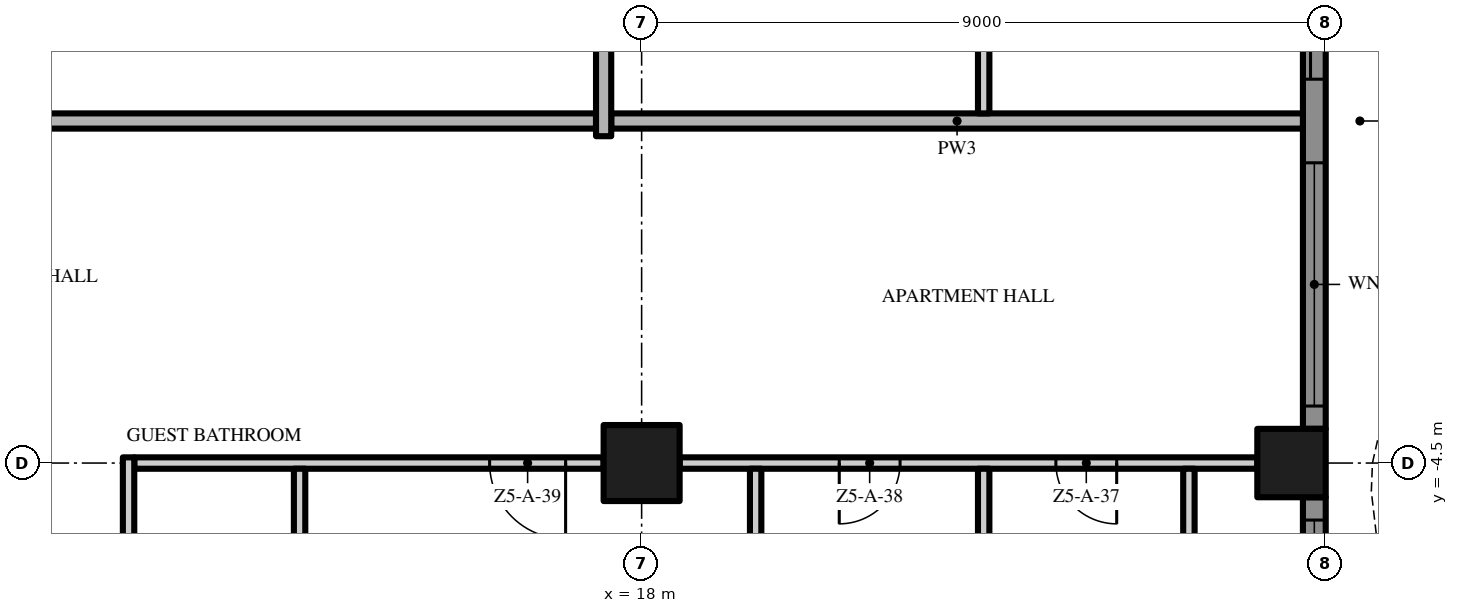
"""IFC4 building model, lengths in metres.
Left out: names, types, materials, properties, quantities, classifications, styles, units other than length and angle.
Written with IfcOpenShell. Run it as: python <this file> out.ifc"""

import sys

from ifc_helpers import new_model, si_unit, direction, frame, frame_2d, origin, origin_2d, place, context, subcontext, project, spatial, polyline, rectangle, outline, extrude, element, fill, save


model = new_model("IFC4")
c1 = context("Model", 3, precision=1e-05, world=origin(), true_north=direction((0.0, 1.0)))
c2 = subcontext(c1, "Body", "Model", "MODEL_VIEW")
j1 = project(units=[si_unit("LENGTHUNIT", "METRE"), si_unit("PLANEANGLEUNIT", "RADIAN")], contexts=[c1])
p1 = place(None, origin())
s1 = spatial("IfcSite", under=j1, at=p1, CompositionType="ELEMENT")
p2 = place(p1, origin())
s2 = spatial("IfcBuilding", under=s1, at=p2, CompositionType="ELEMENT")
p3 = place(p2, frame((0.0, 0.0, 238.8)))
s3 = spatial("IfcBuildingStorey", under=s2, at=p3, CompositionType="ELEMENT", Elevation=238.8)
p4 = place(p3, frame((18.0, -4.5, 0.0), z_axis=(0.0, 0.0, 1.0), x_axis=(1.0, 0.0, 0.0)))
e1 = element("IfcColumn", 1, at=p4, inside=s3, PredefinedType="COLUMN", context=c2, shape_type="SweptSolid", body=[
    extrude(rectangle(XDim=1.0, YDim=1.0, at=origin_2d()), origin(), (0.0, 0.0, 1.0), 3.5),
])
p5 = place(p3, frame((26.55, -4.5, 0.0), z_axis=(0.0, 0.0, 1.0), x_axis=(1.0, 0.0, 0.0)))
e2 = element("IfcColumn", 2, at=p5, inside=s3, PredefinedType="COLUMN", context=c2, shape_type="SweptSolid", body=[
    extrude(rectangle(XDim=0.9, YDim=0.9, at=origin_2d()), origin(), (0.0, 0.0, 1.0), 3.5),
])
p6 = place(p3, frame((26.85, -4.95, 0.0), z_axis=(0.0, 0.0, 1.0), x_axis=(0.0, -1.0, 0.0)))
e3 = element("IfcWall", 3, at=p6, inside=s3, PredefinedType="SOLIDWALL", context=c2, shape_type="SweptSolid", body=[
    extrude(rectangle(XDim=8.1, YDim=0.3, at=frame_2d((4.05, 0.0))), origin(), (0.0, 0.0, 1.0), 3.5),
])
p7 = place(p6, frame((4.6, 0.0, 0.0)))
e4 = element("IfcOpeningElement", 4, at=p7, cuts=e3, PredefinedType="OPENING", context=c2, shape_type="SweptSolid", body=[
    extrude(rectangle(XDim=3.2, YDim=2.4, at=frame_2d((1.6, 1.2))), frame((0.0, 0.16, 0.0), z_axis=(0.0, -1.0, 0.0), x_axis=(1.0, 0.0, 0.0)), (0.0, 0.0, 1.0), 0.32),
])
p8 = place(p6, frame((0.3, 0.0, 0.45)))
e5 = element("IfcOpeningElement", 5, at=p8, cuts=e3, PredefinedType="OPENING", context=c2, shape_type="SweptSolid", body=[
    extrude(rectangle(XDim=3.2, YDim=2.65, at=frame_2d((1.6, 1.325))), frame((0.0, 0.16, 0.0), z_axis=(0.0, -1.0, 0.0), x_axis=(1.0, 0.0, 0.0)), (0.0, 0.0, 1.0), 0.32),
])
p9 = place(p3, frame((26.85, 4.05, 0.0), z_axis=(0.0, 0.0, 1.0), x_axis=(0.0, -1.0, 0.0)))
e6 = element("IfcWall", 6, at=p9, inside=s3, PredefinedType="SOLIDWALL", context=c2, shape_type="SweptSolid", body=[
    extrude(rectangle(XDim=8.1, YDim=0.3, at=frame_2d((4.05, 0.0))), origin(), (0.0, 0.0, 1.0), 3.5),
])
p10 = place(p9, frame((4.6, 0.0, 0.45)))
e7 = element("IfcOpeningElement", 7, at=p10, cuts=e6, PredefinedType="OPENING", context=c2, shape_type="SweptSolid", body=[
    extrude(rectangle(XDim=3.2, YDim=2.65, at=frame_2d((1.6, 1.325))), frame((0.0, 0.16, 0.0), z_axis=(0.0, -1.0, 0.0), x_axis=(1.0, 0.0, 0.0)), (0.0, 0.0, 1.0), 0.32),
])
p11 = place(p9, frame((0.3, 0.0, 0.0)))
e8 = element("IfcOpeningElement", 8, at=p11, cuts=e6, PredefinedType="OPENING", context=c2, shape_type="SweptSolid", body=[
    extrude(rectangle(XDim=3.2, YDim=2.4, at=frame_2d((1.6, 1.2))), frame((0.0, 0.16, 0.0), z_axis=(0.0, -1.0, 0.0), x_axis=(1.0, 0.0, 0.0)), (0.0, 0.0, 1.0), 0.32),
])
p12 = place(p3, origin())
e9 = element("IfcWall", 9, at=p12, inside=s3, PredefinedType="USERDEFINED", context=c2, shape_type="SweptSolid", body=[
    extrude(outline(polyline([(27.951, -18.0), (28.612, -16.5), (29.345, -15.0), (29.869, -13.5), (30.0, -12.375), (29.985, -12.0), (29.649, -10.5), (28.988, -9.0), (28.255, -7.5), (27.731, -6.0), (27.6, -4.875), (27.615, -4.5), (27.951, -3.0), (28.612, -1.5), (29.345, 0.0), (29.869, 1.5), (30.0, 2.625), (29.985, 3.0), (29.649, 4.5), (28.988, 6.0), (28.255, 7.5), (27.731, 9.0), (27.6, 10.125), (27.615, 10.5), (27.951, 12.0), (28.612, 13.5), (29.345, 15.0), (29.869, 16.5), (30.0, 17.625), (29.985, 18.0), (29.735, 17.99), (29.749, 17.635), (29.624, 16.556), (29.114, 15.096), (28.385, 13.605), (27.713, 12.079), (27.366, 10.533), (27.349, 10.115), (27.486, 8.944), (28.024, 7.404), (28.761, 5.895), (29.41, 4.421), (29.736, 2.967), (29.749, 2.635), (29.624, 1.556), (29.114, 0.096), (28.385, -1.395), (27.713, -2.921), (27.366, -4.467), (27.349, -4.885), (27.486, -6.056), (28.024, -7.596), (28.761, -9.105), (29.41, -10.579), (29.736, -12.033), (29.749, -12.365), (29.624, -13.444), (29.114, -14.904), (28.385, -16.395), (27.723, -17.899), (27.951, -18.0)])), origin(), (0.0, 0.0, 1.0), 0.9),
])
p13 = place(p3, frame((17.5, -4.5, 0.0), z_axis=(0.0, 0.0, 1.0), x_axis=(-1.0, 0.0, 0.0)))
e10 = element("IfcWall", 10, at=p13, inside=s3, PredefinedType="PARTITIONING", context=c2, shape_type="SweptSolid", body=[
    extrude(rectangle(XDim=6.175, YDim=0.15, at=frame_2d((3.087, 0.0))), origin(), (0.0, 0.0, 1.0), 3.5),
])
p14 = place(p13, frame((0.5, 0.0, 0.0)))
e11 = element("IfcOpeningElement", 11, at=p14, cuts=e10, PredefinedType="OPENING", context=c2, shape_type="SweptSolid", body=[
    extrude(rectangle(XDim=1.0, YDim=2.4, at=frame_2d((0.5, 1.2))), frame((0.0, 0.085, 0.0), z_axis=(0.0, -1.0, 0.0), x_axis=(1.0, 0.0, 0.0)), (0.0, 0.0, 1.0), 0.17),
])
p15 = place(p3, frame((26.1, -4.5, 0.0), z_axis=(0.0, 0.0, 1.0), x_axis=(-1.0, 0.0, 0.0)))
e12 = element("IfcWall", 12, at=p15, inside=s3, PredefinedType="PARTITIONING", context=c2, shape_type="SweptSolid", body=[
    extrude(rectangle(XDim=7.6, YDim=0.15, at=frame_2d((3.8, 0.0))), origin(), (0.0, 0.0, 1.0), 3.5),
])
p16 = place(p15, frame((1.85, 0.0, 0.0)))
e13 = element("IfcOpeningElement", 13, at=p16, cuts=e12, PredefinedType="OPENING", context=c2, shape_type="SweptSolid", body=[
    extrude(rectangle(XDim=0.8, YDim=2.0, at=frame_2d((0.4, 1.0))), frame((0.0, 0.085, 0.0), z_axis=(0.0, -1.0, 0.0), x_axis=(1.0, 0.0, 0.0)), (0.0, 0.0, 1.0), 0.17),
])
p17 = place(p15, frame((4.7, 0.0, 0.0)))
e14 = element("IfcOpeningElement", 14, at=p17, cuts=e12, PredefinedType="OPENING", context=c2, shape_type="SweptSolid", body=[
    extrude(rectangle(XDim=0.8, YDim=2.0, at=frame_2d((0.4, 1.0))), frame((0.0, 0.085, 0.0), z_axis=(0.0, -1.0, 0.0), x_axis=(1.0, 0.0, 0.0)), (0.0, 0.0, 1.0), 0.17),
])
p18 = place(p3, frame((17.4, 0.0, 0.0), z_axis=(0.0, 0.0, 1.0), x_axis=(-1.0, 0.0, 0.0)))
e15 = element("IfcWall", 15, at=p18, inside=s3, PredefinedType="PARTITIONING", context=c2, shape_type="SweptSolid", body=[
    extrude(rectangle(XDim=34.8, YDim=0.2, at=frame_2d((17.4, 0.0))), origin(), (0.0, 0.0, 1.0), 3.5),
])
p19 = place(p18, frame((25.65, 0.0, 0.0)))
e16 = element("IfcOpeningElement", 16, at=p19, cuts=e15, PredefinedType="OPENING", context=c2, shape_type="SweptSolid", body=[
    extrude(rectangle(XDim=1.5, YDim=2.4, at=frame_2d((0.75, 1.2))), frame((0.0, 0.11, 0.0), z_axis=(0.0, -1.0, 0.0), x_axis=(1.0, 0.0, 0.0)), (0.0, 0.0, 1.0), 0.22),
])
p20 = place(p18, frame((7.65, 0.0, 0.0)))
e17 = element("IfcOpeningElement", 17, at=p20, cuts=e15, PredefinedType="OPENING", context=c2, shape_type="SweptSolid", body=[
    extrude(rectangle(XDim=1.5, YDim=2.4, at=frame_2d((0.75, 1.2))), frame((0.0, 0.11, 0.0), z_axis=(0.0, -1.0, 0.0), x_axis=(1.0, 0.0, 0.0)), (0.0, 0.0, 1.0), 0.22),
])
p21 = place(p3, frame((17.6, 0.0, 0.0), z_axis=(0.0, 0.0, 1.0), x_axis=(1.0, 0.0, 0.0)))
e18 = element("IfcWall", 18, at=p21, inside=s3, PredefinedType="PARTITIONING", context=c2, shape_type="SweptSolid", body=[
    extrude(rectangle(XDim=9.1, YDim=0.2, at=frame_2d((4.55, 0.0))), origin(), (0.0, 0.0, 1.0), 3.5),
])
p22 = place(p3, frame((11.25, -4.425, 0.0), z_axis=(0.0, 0.0, 1.0), x_axis=(0.0, -1.0, 0.0)))
e19 = element("IfcWall", 19, at=p22, inside=s3, PredefinedType="PARTITIONING", context=c2, shape_type="SweptSolid", body=[
    extrude(rectangle(XDim=4.65, YDim=0.15, at=frame_2d((2.325, 0.0))), origin(), (0.0, 0.0, 1.0), 3.5),
])
p23 = place(p22, frame((1.875, 0.0, 0.0)))
e20 = element("IfcOpeningElement", 20, at=p23, cuts=e19, PredefinedType="OPENING", context=c2, shape_type="SweptSolid", body=[
    extrude(rectangle(XDim=0.9, YDim=2.1, at=frame_2d((0.45, 1.05))), frame((0.0, 0.085, 0.0), z_axis=(0.0, -1.0, 0.0), x_axis=(1.0, 0.0, 0.0)), (0.0, 0.0, 1.0), 0.17),
])
p24 = place(p3, frame((13.5, -8.925, 0.0), z_axis=(0.0, 0.0, 1.0), x_axis=(0.0, 1.0, 0.0)))
e21 = element("IfcWall", 21, at=p24, inside=s3, PredefinedType="PARTITIONING", context=c2, shape_type="SweptSolid", body=[
    extrude(rectangle(XDim=4.35, YDim=0.15, at=frame_2d((2.175, 0.0))), origin(), (0.0, 0.0, 1.0), 3.5),
])
p25 = place(p3, frame((17.5, -0.2, 0.0), z_axis=(0.0, 0.0, 1.0), x_axis=(0.0, 1.0, 0.0)))
e22 = element("IfcWall", 22, at=p25, inside=s3, PredefinedType="PARTITIONING", context=c2, shape_type="SweptSolid", body=[
    extrude(rectangle(XDim=4.2, YDim=0.2, at=frame_2d((2.1, 0.0))), origin(), (0.0, 0.0, 1.0), 3.5),
])
for number, where, z_axis, x_axis in (
    (23, (19.5, -8.925, 0.0), (0.0, 0.0, 1.0), (0.0, 1.0, 0.0)),
    (24, (22.5, -8.925, 0.0), (0.0, 0.0, 1.0), (0.0, 1.0, 0.0)),
):
    element("IfcWall", number, at=place(p3, frame(where, z_axis=z_axis, x_axis=x_axis)), inside=s3, PredefinedType="PARTITIONING", context=c2, shape_type="SweptSolid", body=[
        extrude(rectangle(XDim=4.35, YDim=0.15, at=frame_2d((2.175, 0.0))), origin(), (0.0, 0.0, 1.0), 3.5),
    ])
p26 = place(p3, frame((22.5, 17.55, 0.0), z_axis=(0.0, 0.0, 1.0), x_axis=(0.0, -1.0, 0.0)))
e25 = element("IfcWall", 25, at=p26, inside=s3, PredefinedType="PARTITIONING", context=c2, shape_type="SweptSolid", body=[
    extrude(rectangle(XDim=17.45, YDim=0.15, at=frame_2d((8.725, 0.0))), origin(), (0.0, 0.0, 1.0), 3.5),
])
p27 = place(p26, frame((14.8, 0.0, 0.0)))
e26 = element("IfcOpeningElement", 26, at=p27, cuts=e25, PredefinedType="OPENING", context=c2, shape_type="SweptSolid", body=[
    extrude(rectangle(XDim=1.0, YDim=2.4, at=frame_2d((0.5, 1.2))), frame((0.0, 0.085, 0.0), z_axis=(0.0, -1.0, 0.0), x_axis=(1.0, 0.0, 0.0)), (0.0, 0.0, 1.0), 0.17),
])
p28 = place(p26, frame((11.45, 0.0, 0.0)))
e27 = element("IfcOpeningElement", 27, at=p28, cuts=e25, PredefinedType="OPENING", context=c2, shape_type="SweptSolid", body=[
    extrude(rectangle(XDim=1.0, YDim=2.4, at=frame_2d((0.5, 1.2))), frame((0.0, 0.085, 0.0), z_axis=(0.0, -1.0, 0.0), x_axis=(1.0, 0.0, 0.0)), (0.0, 0.0, 1.0), 0.17),
])
p29 = place(p26, frame((4.3, 0.0, 0.0)))
e28 = element("IfcOpeningElement", 28, at=p29, cuts=e25, PredefinedType="OPENING", context=c2, shape_type="SweptSolid", body=[
    extrude(rectangle(XDim=1.0, YDim=2.4, at=frame_2d((0.5, 1.2))), frame((0.0, 0.085, 0.0), z_axis=(0.0, -1.0, 0.0), x_axis=(1.0, 0.0, 0.0)), (0.0, 0.0, 1.0), 0.17),
])
p30 = place(p3, frame((25.2, -8.925, 0.0), z_axis=(0.0, 0.0, 1.0), x_axis=(0.0, 1.0, 0.0)))
e29 = element("IfcWall", 29, at=p30, inside=s3, PredefinedType="PARTITIONING", context=c2, shape_type="SweptSolid", body=[
    extrude(rectangle(XDim=4.35, YDim=0.15, at=frame_2d((2.175, 0.0))), origin(), (0.0, 0.0, 1.0), 3.5),
])
p31 = place(p8, origin())
e30 = element("IfcWindow", 30, at=p31, inside=s3, PartitioningType="SINGLE_PANEL", PredefinedType="WINDOW", context=c2, shape_type="SweptSolid", body=[
    extrude(rectangle(XDim=3.2, YDim=2.65, at=frame_2d((1.6, 1.325))), frame((0.0, 0.03, 0.0), z_axis=(0.0, -1.0, 0.0), x_axis=(1.0, 0.0, 0.0)), (0.0, 0.0, 1.0), 0.06),
])
fill(e5, e30)
p32 = place(p10, origin())
e31 = element("IfcWindow", 31, at=p32, inside=s3, PartitioningType="SINGLE_PANEL", PredefinedType="WINDOW", context=c2, shape_type="SweptSolid", body=[
    extrude(rectangle(XDim=3.2, YDim=2.65, at=frame_2d((1.6, 1.325))), frame((0.0, 0.03, 0.0), z_axis=(0.0, -1.0, 0.0), x_axis=(1.0, 0.0, 0.0)), (0.0, 0.0, 1.0), 0.06),
])
fill(e7, e31)
p33 = place(p11, origin())
e32 = element("IfcDoor", 32, at=p33, inside=s3, OperationType="SINGLE_SWING_LEFT", PredefinedType="DOOR", context=c2, shape_type="SweptSolid", body=[
    extrude(rectangle(XDim=3.2, YDim=2.4, at=frame_2d((1.6, 1.2))), frame((0.0, 0.025, 0.0), z_axis=(0.0, -1.0, 0.0), x_axis=(1.0, 0.0, 0.0)), (0.0, 0.0, 1.0), 0.05),
])
fill(e8, e32)
p34 = place(p16, origin())
e33 = element("IfcDoor", 33, at=p34, inside=s3, OperationType="SINGLE_SWING_LEFT", PredefinedType="DOOR", context=c2, shape_type="SweptSolid", body=[
    extrude(rectangle(XDim=0.8, YDim=2.0, at=frame_2d((0.4, 1.0))), frame((0.0, 0.025, 0.0), z_axis=(0.0, -1.0, 0.0), x_axis=(1.0, 0.0, 0.0)), (0.0, 0.0, 1.0), 0.05),
])
fill(e13, e33)
p35 = place(p17, origin())
e34 = element("IfcDoor", 34, at=p35, inside=s3, OperationType="SINGLE_SWING_RIGHT", PredefinedType="DOOR", context=c2, shape_type="SweptSolid", body=[
    extrude(rectangle(XDim=0.8, YDim=2.0, at=frame_2d((0.4, 1.0))), frame((0.0, 0.025, 0.0), z_axis=(0.0, -1.0, 0.0), x_axis=(1.0, 0.0, 0.0)), (0.0, 0.0, 1.0), 0.05),
])
fill(e14, e34)
p36 = place(p14, origin())
e35 = element("IfcDoor", 35, at=p36, inside=s3, OperationType="SINGLE_SWING_LEFT", PredefinedType="DOOR", context=c2, shape_type="SweptSolid", body=[
    extrude(rectangle(XDim=1.0, YDim=2.4, at=frame_2d((0.5, 1.2))), frame((0.0, 0.025, 0.0), z_axis=(0.0, -1.0, 0.0), x_axis=(1.0, 0.0, 0.0)), (0.0, 0.0, 1.0), 0.05),
])
fill(e11, e35)
save(model, sys.argv[1])
